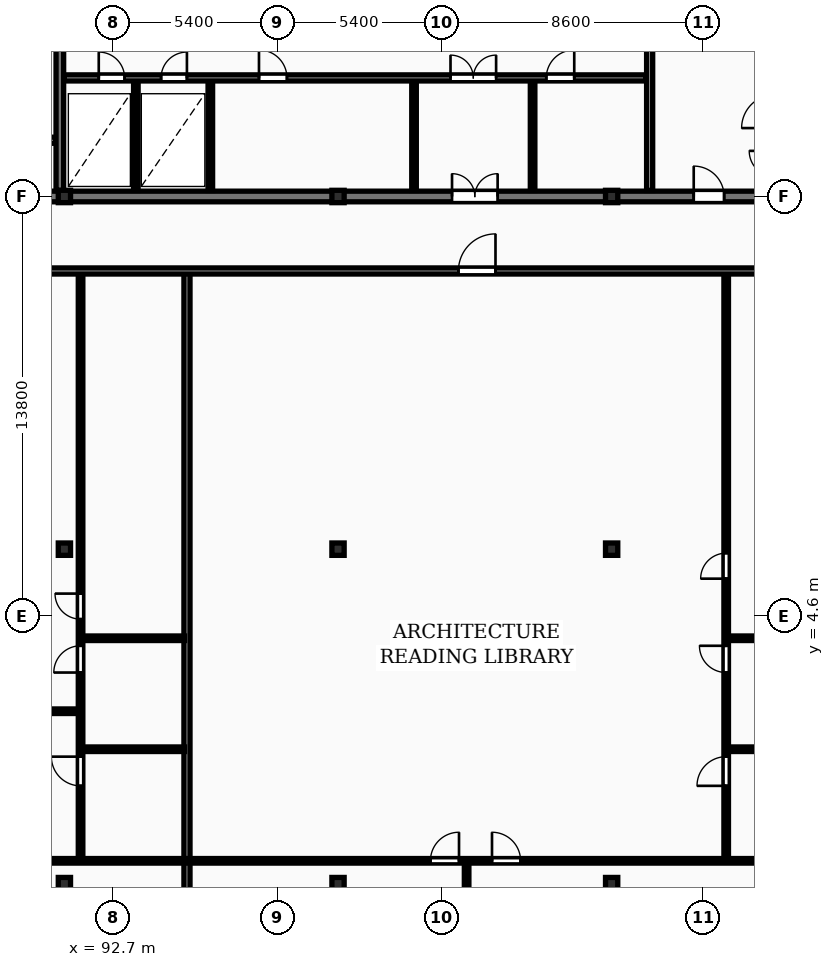
"""IFC4 building model, lengths in metres.
Left out: names, types, materials, properties, quantities, classifications, styles, units other than length and angle.
Written with IfcOpenShell. Run it as: python <this file> out.ifc"""

import sys

from ifc_helpers import new_model, si_unit, direction, frame, frame_2d, origin, origin_2d, place, context, subcontext, project, spatial, rectangle, i_section, extrude, element, fill, save


model = new_model("IFC4")
c1 = context("Model", 3, precision=1e-05, world=origin(), true_north=direction((0.0, 1.0)))
c2 = subcontext(c1, "Body", "Model", "MODEL_VIEW")
j1 = project(units=[si_unit("LENGTHUNIT", "METRE"), si_unit("PLANEANGLEUNIT", "RADIAN")], contexts=[c1])
p1 = place(None, origin())
s1 = spatial("IfcSite", under=j1, at=p1, CompositionType="ELEMENT")
p2 = place(p1, origin())
s2 = spatial("IfcBuilding", under=s1, at=p2, CompositionType="ELEMENT")
p3 = place(p2, frame((0.0, 0.0, 153.7)))
s3 = spatial("IfcBuildingStorey", under=s2, at=p3, CompositionType="ELEMENT", Elevation=153.7)
for number, where, z_axis, x_axis in (
    (1, (91.1, -4.2, 0.0), (0.0, 0.0, 1.0), (1.0, 0.0, 0.0)),
    (2, (91.1, 6.8, 0.0), (0.0, 0.0, 1.0), (1.0, 0.0, 0.0)),
    (3, (91.1, 18.4, 0.0), (0.0, 0.0, 1.0), (1.0, 0.0, 0.0)),
    (4, (100.1, -4.2, 0.0), (0.0, 0.0, 1.0), (1.0, 0.0, 0.0)),
    (5, (100.1, 6.8, 0.0), (0.0, 0.0, 1.0), (1.0, 0.0, 0.0)),
    (6, (100.1, 18.4, 0.0), (0.0, 0.0, 1.0), (1.0, 0.0, 0.0)),
    (7, (109.1, -4.2, 0.0), (0.0, 0.0, 1.0), (1.0, 0.0, 0.0)),
    (8, (109.1, 6.8, 0.0), (0.0, 0.0, 1.0), (1.0, 0.0, 0.0)),
    (9, (109.1, 18.4, 0.0), (0.0, 0.0, 1.0), (1.0, 0.0, 0.0)),
):
    element("IfcColumn", number, at=place(p3, frame(where, z_axis=z_axis, x_axis=x_axis)), inside=s3, PredefinedType="COLUMN", context=c2, shape_type="SweptSolid", body=[
        extrude(i_section(OverallWidth=0.403, OverallDepth=0.406, WebThickness=0.027, FlangeThickness=0.043, FilletRadius=0.015, at=origin_2d()), origin(), (0.0, 0.0, 1.0), 3.6),
    ])
p4 = place(p3, frame((81.925, 18.4, 0.0), z_axis=(0.0, 0.0, 1.0), x_axis=(1.0, 0.0, 0.0)))
e10 = element("IfcWall", 10, at=p4, inside=s3, PredefinedType="SHEAR", context=c2, shape_type="SweptSolid", body=[
    extrude(rectangle(XDim=36.265, YDim=0.35, at=frame_2d((18.132, 0.0))), origin(), (0.0, 0.0, 1.0), 3.6),
])
p5 = place(p4, frame((5.675, 0.0, 0.0)))
e11 = element("IfcOpeningElement", 11, at=p5, cuts=e10, PredefinedType="OPENING", context=c2, shape_type="SweptSolid", body=[
    extrude(rectangle(XDim=1.0, YDim=2.15, at=frame_2d((0.5, 1.075))), frame((0.0, 0.185, 0.0), z_axis=(0.0, -1.0, 0.0), x_axis=(1.0, 0.0, 0.0)), (0.0, 0.0, 1.0), 0.37),
])
p6 = place(p4, frame((21.925, 0.0, 0.0)))
e12 = element("IfcOpeningElement", 12, at=p6, cuts=e10, PredefinedType="OPENING", context=c2, shape_type="SweptSolid", body=[
    extrude(rectangle(XDim=1.5, YDim=2.2, at=frame_2d((0.75, 1.1))), frame((0.0, 0.185, 0.0), z_axis=(0.0, -1.0, 0.0), x_axis=(1.0, 0.0, 0.0)), (0.0, 0.0, 1.0), 0.37),
])
p7 = place(p4, frame((29.875, 0.0, 0.0)))
e13 = element("IfcOpeningElement", 13, at=p7, cuts=e10, PredefinedType="OPENING", context=c2, shape_type="SweptSolid", body=[
    extrude(rectangle(XDim=1.0, YDim=2.15, at=frame_2d((0.5, 1.075))), frame((0.0, 0.185, 0.0), z_axis=(0.0, -1.0, 0.0), x_axis=(1.0, 0.0, 0.0)), (0.0, 0.0, 1.0), 0.37),
])
p8 = place(p3, frame((86.5, 20.25, 0.0), z_axis=(0.0, 0.0, 1.0), x_axis=(1.0, 0.0, 0.0)))
e14 = element("IfcWall", 14, at=p8, inside=s3, PredefinedType="PARTITIONING", context=c2, shape_type="SweptSolid", body=[
    extrude(rectangle(XDim=4.32, YDim=0.2, at=frame_2d((2.16, 0.0))), origin(), (0.0, 0.0, 1.0), 3.32),
])
p9 = place(p8, frame((1.4, 0.0, 0.0)))
e15 = element("IfcOpeningElement", 15, at=p9, cuts=e14, PredefinedType="OPENING", context=c2, shape_type="SweptSolid", body=[
    extrude(rectangle(XDim=1.1, YDim=2.1, at=frame_2d((0.55, 1.05))), frame((0.0, 0.11, 0.0), z_axis=(0.0, -1.0, 0.0), x_axis=(1.0, 0.0, 0.0)), (0.0, 0.0, 1.0), 0.22),
])
p10 = place(p3, frame((90.95, 18.6, 0.0), z_axis=(0.0, 0.0, 1.0), x_axis=(0.0, 1.0, 0.0)))
e16 = element("IfcWall", 16, at=p10, inside=s3, PredefinedType="SHEAR", context=c2, shape_type="SweptSolid", body=[
    extrude(rectangle(XDim=11.6, YDim=0.25, at=frame_2d((5.8, 0.0))), origin(), (0.0, 0.0, 1.0), 3.6),
])
p11 = place(p10, frame((4.6, 0.0, 0.0)))
e17 = element("IfcOpeningElement", 17, at=p11, cuts=e16, PredefinedType="OPENING", context=c2, shape_type="SweptSolid", body=[
    extrude(rectangle(XDim=1.1, YDim=2.1, at=frame_2d((0.55, 1.05))), frame((0.0, 0.135, 0.0), z_axis=(0.0, -1.0, 0.0), x_axis=(1.0, 0.0, 0.0)), (0.0, 0.0, 1.0), 0.27),
])
for number, where, z_axis, x_axis in (
    (18, (93.45, 18.6, 0.0), (0.0, 0.0, 1.0), (0.0, 1.0, 0.0)),
    (19, (95.9, 18.6, 0.0), (0.0, 0.0, 1.0), (0.0, 1.0, 0.0)),
    (20, (102.6, 18.6, 0.0), (0.0, 0.0, 1.0), (0.0, 1.0, 0.0)),
    (21, (106.5, 18.6, 0.0), (0.0, 0.0, 1.0), (0.0, 1.0, 0.0)),
):
    element("IfcWall", number, at=place(p3, frame(where, z_axis=z_axis, x_axis=x_axis)), inside=s3, PredefinedType="PARTITIONING", context=c2, shape_type="SweptSolid", body=[
        extrude(rectangle(XDim=3.6, YDim=0.15, at=frame_2d((1.8, 0.0))), origin(), (0.0, 0.0, 1.0), 3.32),
    ])
p12 = place(p3, frame((91.08, 22.3, 0.0), z_axis=(0.0, 0.0, 1.0), x_axis=(1.0, 0.0, 0.0)))
e22 = element("IfcWall", 22, at=p12, inside=s3, PredefinedType="PARTITIONING", context=c2, shape_type="SweptSolid", body=[
    extrude(rectangle(XDim=19.14, YDim=0.2, at=frame_2d((9.57, 0.0))), origin(), (0.0, 0.0, 1.0), 3.32),
])
p13 = place(p12, frame((1.15, 0.0, 0.0)))
e23 = element("IfcOpeningElement", 23, at=p13, cuts=e22, PredefinedType="OPENING", context=c2, shape_type="SweptSolid", body=[
    extrude(rectangle(XDim=0.85, YDim=2.05, at=frame_2d((0.425, 1.025))), frame((0.0, 0.11, 0.0), z_axis=(0.0, -1.0, 0.0), x_axis=(1.0, 0.0, 0.0)), (0.0, 0.0, 1.0), 0.22),
])
p14 = place(p12, frame((3.2, 0.0, 0.0)))
e24 = element("IfcOpeningElement", 24, at=p14, cuts=e22, PredefinedType="OPENING", context=c2, shape_type="SweptSolid", body=[
    extrude(rectangle(XDim=0.85, YDim=2.05, at=frame_2d((0.425, 1.025))), frame((0.0, 0.11, 0.0), z_axis=(0.0, -1.0, 0.0), x_axis=(1.0, 0.0, 0.0)), (0.0, 0.0, 1.0), 0.22),
])
p15 = place(p12, frame((12.72, 0.0, 0.0)))
e25 = element("IfcOpeningElement", 25, at=p15, cuts=e22, PredefinedType="OPENING", context=c2, shape_type="SweptSolid", body=[
    extrude(rectangle(XDim=1.5, YDim=2.2, at=frame_2d((0.75, 1.1))), frame((0.0, 0.11, 0.0), z_axis=(0.0, -1.0, 0.0), x_axis=(1.0, 0.0, 0.0)), (0.0, 0.0, 1.0), 0.22),
])
p16 = place(p12, frame((6.42, 0.0, 0.0)))
e26 = element("IfcOpeningElement", 26, at=p16, cuts=e22, PredefinedType="OPENING", context=c2, shape_type="SweptSolid", body=[
    extrude(rectangle(XDim=0.92, YDim=2.08, at=frame_2d((0.46, 1.04))), frame((0.0, 0.11, 0.0), z_axis=(0.0, -1.0, 0.0), x_axis=(1.0, 0.0, 0.0)), (0.0, 0.0, 1.0), 0.22),
])
p17 = place(p12, frame((15.87, 0.0, 0.0)))
e27 = element("IfcOpeningElement", 27, at=p17, cuts=e22, PredefinedType="OPENING", context=c2, shape_type="SweptSolid", body=[
    extrude(rectangle(XDim=0.92, YDim=2.08, at=frame_2d((0.46, 1.04))), frame((0.0, 0.11, 0.0), z_axis=(0.0, -1.0, 0.0), x_axis=(1.0, 0.0, 0.0)), (0.0, 0.0, 1.0), 0.22),
])
p18 = place(p3, frame((110.35, 18.6, 0.0), z_axis=(0.0, 0.0, 1.0), x_axis=(0.0, 1.0, 0.0)))
e28 = element("IfcWall", 28, at=p18, inside=s3, PredefinedType="PARTITIONING", context=c2, shape_type="SweptSolid", body=[
    extrude(rectangle(XDim=11.6, YDim=0.2, at=frame_2d((5.8, 0.0))), origin(), (0.0, 0.0, 1.0), 3.32),
])
p19 = place(p18, frame((5.2, 0.0, 0.0)))
e29 = element("IfcOpeningElement", 29, at=p19, cuts=e28, PredefinedType="OPENING", context=c2, shape_type="SweptSolid", body=[
    extrude(rectangle(XDim=1.1, YDim=2.15, at=frame_2d((0.55, 1.075))), frame((0.0, 0.11, 0.0), z_axis=(0.0, -1.0, 0.0), x_axis=(1.0, 0.0, 0.0)), (0.0, 0.0, 1.0), 0.22),
])
p20 = place(p3, frame((95.132, -8.7, 0.0), z_axis=(0.0, 0.0, 1.0), x_axis=(0.0, 1.0, 0.0)))
e30 = element("IfcWall", 30, at=p20, inside=s3, PredefinedType="PARTITIONING", context=c2, shape_type="SweptSolid", body=[
    extrude(rectangle(XDim=24.57, YDim=0.2, at=frame_2d((12.285, 0.0))), origin(), (0.0, 0.0, 1.0), 3.32),
])
p21 = place(p3, frame((72.78, 1.47, 0.0), z_axis=(0.0, 0.0, 1.0), x_axis=(1.0, 0.0, 0.0)))
e31 = element("IfcWall", 31, at=p21, inside=s3, PredefinedType="PARTITIONING", context=c2, shape_type="SweptSolid", body=[
    extrude(rectangle(XDim=18.812, YDim=0.15, at=frame_2d((9.406, 0.0))), origin(), (0.0, 0.0, 1.0), 3.32),
])
p22 = place(p21, frame((8.936, 0.0, 0.0)))
e32 = element("IfcOpeningElement", 32, at=p22, cuts=e31, PredefinedType="OPENING", context=c2, shape_type="SweptSolid", body=[
    extrude(rectangle(XDim=0.94, YDim=2.1, at=frame_2d((0.47, 1.05))), frame((0.0, 0.085, 0.0), z_axis=(0.0, -1.0, 0.0), x_axis=(1.0, 0.0, 0.0)), (0.0, 0.0, 1.0), 0.17),
])
for number, where, z_axis, x_axis in (
    (33, (91.691, 0.22, 0.0), (0.0, 0.0, 1.0), (1.0, 0.0, 0.0)),
    (34, (91.691, 3.87, 0.0), (0.0, 0.0, 1.0), (1.0, 0.0, 0.0)),
):
    element("IfcWall", number, at=place(p3, frame(where, z_axis=z_axis, x_axis=x_axis)), inside=s3, PredefinedType="PARTITIONING", context=c2, shape_type="SweptSolid", body=[
        extrude(rectangle(XDim=3.36, YDim=0.15, at=frame_2d((1.68, 0.0))), origin(), (0.0, 0.0, 1.0), 3.32),
    ])
p23 = place(p3, frame((91.632, -3.39, 0.0), z_axis=(0.0, 0.0, 1.0), x_axis=(0.0, 1.0, 0.0)))
e35 = element("IfcWall", 35, at=p23, inside=s3, PredefinedType="PARTITIONING", context=c2, shape_type="SweptSolid", body=[
    extrude(rectangle(XDim=19.28, YDim=0.15, at=frame_2d((9.64, 0.0))), origin(), (0.0, 0.0, 1.0), 3.32),
])
p24 = place(p23, frame((2.406, 0.0, 0.0)))
e36 = element("IfcOpeningElement", 36, at=p24, cuts=e35, PredefinedType="OPENING", context=c2, shape_type="SweptSolid", body=[
    extrude(rectangle(XDim=0.96, YDim=2.1, at=frame_2d((0.48, 1.05))), frame((0.0, 0.085, 0.0), z_axis=(0.0, -1.0, 0.0), x_axis=(1.0, 0.0, 0.0)), (0.0, 0.0, 1.0), 0.17),
])
p25 = place(p23, frame((6.133, 0.0, 0.0)))
e37 = element("IfcOpeningElement", 37, at=p25, cuts=e35, PredefinedType="OPENING", context=c2, shape_type="SweptSolid", body=[
    extrude(rectangle(XDim=0.88, YDim=2.06, at=frame_2d((0.44, 1.03))), frame((0.0, 0.085, 0.0), z_axis=(0.0, -1.0, 0.0), x_axis=(1.0, 0.0, 0.0)), (0.0, 0.0, 1.0), 0.17),
])
p26 = place(p23, frame((7.889, 0.0, 0.0)))
e38 = element("IfcOpeningElement", 38, at=p26, cuts=e35, PredefinedType="OPENING", context=c2, shape_type="SweptSolid", body=[
    extrude(rectangle(XDim=0.84, YDim=2.04, at=frame_2d((0.42, 1.02))), frame((0.0, 0.085, 0.0), z_axis=(0.0, -1.0, 0.0), x_axis=(1.0, 0.0, 0.0)), (0.0, 0.0, 1.0), 0.17),
])
p27 = place(p3, frame((72.78, -3.45, 0.0), z_axis=(0.0, 0.0, 1.0), x_axis=(1.0, 0.0, 0.0)))
e39 = element("IfcWall", 39, at=p27, inside=s3, PredefinedType="PARTITIONING", context=c2, shape_type="SweptSolid", body=[
    extrude(rectangle(XDim=22.271, YDim=0.15, at=frame_2d((11.136, 0.0))), origin(), (0.0, 0.0, 1.0), 3.32),
])
p28 = place(p27, frame((6.871, 0.0, 0.0)))
e40 = element("IfcOpeningElement", 40, at=p28, cuts=e39, PredefinedType="OPENING", context=c2, shape_type="SweptSolid", body=[
    extrude(rectangle(XDim=0.94, YDim=2.1, at=frame_2d((0.47, 1.05))), frame((0.0, 0.085, 0.0), z_axis=(0.0, -1.0, 0.0), x_axis=(1.0, 0.0, 0.0)), (0.0, 0.0, 1.0), 0.17),
])
p29 = place(p27, frame((10.735, 0.0, 0.0)))
e41 = element("IfcOpeningElement", 41, at=p29, cuts=e39, PredefinedType="OPENING", context=c2, shape_type="SweptSolid", body=[
    extrude(rectangle(XDim=0.94, YDim=2.1, at=frame_2d((0.47, 1.05))), frame((0.0, 0.085, 0.0), z_axis=(0.0, -1.0, 0.0), x_axis=(1.0, 0.0, 0.0)), (0.0, 0.0, 1.0), 0.17),
])
for number, where, z_axis, x_axis in (
    (42, (112.928, 0.22, 0.0), (0.0, 0.0, 1.0), (1.0, 0.0, 0.0)),
    (43, (112.928, 3.87, 0.0), (0.0, 0.0, 1.0), (1.0, 0.0, 0.0)),
):
    element("IfcWall", number, at=place(p3, frame(where, z_axis=z_axis, x_axis=x_axis)), inside=s3, PredefinedType="PARTITIONING", context=c2, shape_type="SweptSolid", body=[
        extrude(rectangle(XDim=3.13, YDim=0.15, at=frame_2d((1.565, 0.0))), origin(), (0.0, 0.0, 1.0), 3.32),
    ])
p30 = place(p3, frame((112.868, -3.39, 0.0), z_axis=(0.0, 0.0, 1.0), x_axis=(0.0, 1.0, 0.0)))
e44 = element("IfcWall", 44, at=p30, inside=s3, PredefinedType="PARTITIONING", context=c2, shape_type="SweptSolid", body=[
    extrude(rectangle(XDim=19.28, YDim=0.15, at=frame_2d((9.64, 0.0))), origin(), (0.0, 0.0, 1.0), 3.32),
])
p31 = place(p30, frame((2.406, 0.0, 0.0)))
e45 = element("IfcOpeningElement", 45, at=p31, cuts=e44, PredefinedType="OPENING", context=c2, shape_type="SweptSolid", body=[
    extrude(rectangle(XDim=0.96, YDim=2.1, at=frame_2d((0.48, 1.05))), frame((0.0, 0.085, 0.0), z_axis=(0.0, -1.0, 0.0), x_axis=(1.0, 0.0, 0.0)), (0.0, 0.0, 1.0), 0.17),
])
p32 = place(p30, frame((6.133, 0.0, 0.0)))
e46 = element("IfcOpeningElement", 46, at=p32, cuts=e44, PredefinedType="OPENING", context=c2, shape_type="SweptSolid", body=[
    extrude(rectangle(XDim=0.88, YDim=2.06, at=frame_2d((0.44, 1.03))), frame((0.0, 0.085, 0.0), z_axis=(0.0, -1.0, 0.0), x_axis=(1.0, 0.0, 0.0)), (0.0, 0.0, 1.0), 0.17),
])
p33 = place(p30, frame((9.22, 0.0, 0.0)))
e47 = element("IfcOpeningElement", 47, at=p33, cuts=e44, PredefinedType="OPENING", context=c2, shape_type="SweptSolid", body=[
    extrude(rectangle(XDim=0.84, YDim=2.04, at=frame_2d((0.42, 1.02))), frame((0.0, 0.085, 0.0), z_axis=(0.0, -1.0, 0.0), x_axis=(1.0, 0.0, 0.0)), (0.0, 0.0, 1.0), 0.17),
])
p34 = place(p3, frame((104.33, -8.7, 0.0), z_axis=(0.0, 0.0, 1.0), x_axis=(0.0, 1.0, 0.0)))
e48 = element("IfcWall", 48, at=p34, inside=s3, PredefinedType="PARTITIONING", context=c2, shape_type="SweptSolid", body=[
    extrude(rectangle(XDim=5.17, YDim=0.15, at=frame_2d((2.585, 0.0))), origin(), (0.0, 0.0, 1.0), 3.32),
])
p35 = place(p3, frame((95.211, -3.45, 0.0), z_axis=(0.0, 0.0, 1.0), x_axis=(1.0, 0.0, 0.0)))
e49 = element("IfcWall", 49, at=p35, inside=s3, PredefinedType="PARTITIONING", context=c2, shape_type="SweptSolid", body=[
    extrude(rectangle(XDim=20.847, YDim=0.15, at=frame_2d((10.423, 0.0))), origin(), (0.0, 0.0, 1.0), 3.32),
])
p36 = place(p35, frame((7.928, 0.0, 0.0)))
e50 = element("IfcOpeningElement", 50, at=p36, cuts=e49, PredefinedType="OPENING", context=c2, shape_type="SweptSolid", body=[
    extrude(rectangle(XDim=0.94, YDim=2.1, at=frame_2d((0.47, 1.05))), frame((0.0, 0.085, 0.0), z_axis=(0.0, -1.0, 0.0), x_axis=(1.0, 0.0, 0.0)), (0.0, 0.0, 1.0), 0.17),
])
p37 = place(p35, frame((9.953, 0.0, 0.0)))
e51 = element("IfcOpeningElement", 51, at=p37, cuts=e49, PredefinedType="OPENING", context=c2, shape_type="SweptSolid", body=[
    extrude(rectangle(XDim=0.94, YDim=2.1, at=frame_2d((0.47, 1.05))), frame((0.0, 0.085, 0.0), z_axis=(0.0, -1.0, 0.0), x_axis=(1.0, 0.0, 0.0)), (0.0, 0.0, 1.0), 0.17),
])
p38 = place(p3, frame((72.7, 15.95, 0.0), z_axis=(0.0, 0.0, 1.0), x_axis=(1.0, 0.0, 0.0)))
e52 = element("IfcWall", 52, at=p38, inside=s3, PredefinedType="PARTITIONING", context=c2, shape_type="SweptSolid", body=[
    extrude(rectangle(XDim=58.0, YDim=0.2, at=frame_2d((29.0, 0.0))), origin(), (0.0, 0.0, 1.0), 3.32),
])
p39 = place(p38, frame((10.967, 0.0, 0.0)))
e53 = element("IfcOpeningElement", 53, at=p39, cuts=e52, PredefinedType="OPENING", context=c2, shape_type="SweptSolid", body=[
    extrude(rectangle(XDim=1.22, YDim=2.18, at=frame_2d((0.61, 1.09))), frame((0.0, 0.11, 0.0), z_axis=(0.0, -1.0, 0.0), x_axis=(1.0, 0.0, 0.0)), (0.0, 0.0, 1.0), 0.22),
])
p40 = place(p38, frame((31.36, 0.0, 0.0)))
e54 = element("IfcOpeningElement", 54, at=p40, cuts=e52, PredefinedType="OPENING", context=c2, shape_type="SweptSolid", body=[
    extrude(rectangle(XDim=1.22, YDim=2.18, at=frame_2d((0.61, 1.09))), frame((0.0, 0.11, 0.0), z_axis=(0.0, -1.0, 0.0), x_axis=(1.0, 0.0, 0.0)), (0.0, 0.0, 1.0), 0.22),
])
p41 = place(p38, frame((45.483, 0.0, 0.0)))
e55 = element("IfcOpeningElement", 55, at=p41, cuts=e52, PredefinedType="OPENING", context=c2, shape_type="SweptSolid", body=[
    extrude(rectangle(XDim=0.95, YDim=2.15, at=frame_2d((0.475, 1.075))), frame((0.0, 0.11, 0.0), z_axis=(0.0, -1.0, 0.0), x_axis=(1.0, 0.0, 0.0)), (0.0, 0.0, 1.0), 0.22),
])
p42 = place(p6, origin())
e56 = element("IfcDoor", 56, at=p42, inside=s3, OperationType="DOUBLE_DOOR_SINGLE_SWING", PredefinedType="DOOR", context=c2, shape_type="SweptSolid", body=[
    extrude(rectangle(XDim=1.5, YDim=2.2, at=frame_2d((0.75, 1.1))), frame((0.0, 0.025, 0.0), z_axis=(0.0, -1.0, 0.0), x_axis=(1.0, 0.0, 0.0)), (0.0, 0.0, 1.0), 0.05),
])
fill(e12, e56)
p43 = place(p7, origin())
e57 = element("IfcDoor", 57, at=p43, inside=s3, OperationType="SINGLE_SWING_LEFT", PredefinedType="DOOR", context=c2, shape_type="SweptSolid", body=[
    extrude(rectangle(XDim=1.0, YDim=2.15, at=frame_2d((0.5, 1.075))), frame((0.0, 0.025, 0.0), z_axis=(0.0, -1.0, 0.0), x_axis=(1.0, 0.0, 0.0)), (0.0, 0.0, 1.0), 0.05),
])
fill(e13, e57)
p44 = place(p13, origin())
e58 = element("IfcDoor", 58, at=p44, inside=s3, OperationType="SINGLE_SWING_LEFT", PredefinedType="DOOR", context=c2, shape_type="SweptSolid", body=[
    extrude(rectangle(XDim=0.85, YDim=2.05, at=frame_2d((0.425, 1.025))), frame((0.0, 0.025, 0.0), z_axis=(0.0, -1.0, 0.0), x_axis=(1.0, 0.0, 0.0)), (0.0, 0.0, 1.0), 0.05),
])
fill(e23, e58)
p45 = place(p14, origin())
e59 = element("IfcDoor", 59, at=p45, inside=s3, OperationType="SINGLE_SWING_RIGHT", PredefinedType="DOOR", context=c2, shape_type="SweptSolid", body=[
    extrude(rectangle(XDim=0.85, YDim=2.05, at=frame_2d((0.425, 1.025))), frame((0.0, 0.025, 0.0), z_axis=(0.0, -1.0, 0.0), x_axis=(1.0, 0.0, 0.0)), (0.0, 0.0, 1.0), 0.05),
])
fill(e24, e59)
p46 = place(p15, origin())
e60 = element("IfcDoor", 60, at=p46, inside=s3, OperationType="DOUBLE_DOOR_SINGLE_SWING", PredefinedType="DOOR", context=c2, shape_type="SweptSolid", body=[
    extrude(rectangle(XDim=1.5, YDim=2.2, at=frame_2d((0.75, 1.1))), frame((0.0, 0.025, 0.0), z_axis=(0.0, -1.0, 0.0), x_axis=(1.0, 0.0, 0.0)), (0.0, 0.0, 1.0), 0.05),
])
fill(e25, e60)
p47 = place(p16, origin())
e61 = element("IfcDoor", 61, at=p47, inside=s3, OperationType="SINGLE_SWING_LEFT", PredefinedType="DOOR", context=c2, shape_type="SweptSolid", body=[
    extrude(rectangle(XDim=0.92, YDim=2.08, at=frame_2d((0.46, 1.04))), frame((0.0, 0.025, 0.0), z_axis=(0.0, -1.0, 0.0), x_axis=(1.0, 0.0, 0.0)), (0.0, 0.0, 1.0), 0.05),
])
fill(e26, e61)
p48 = place(p17, origin())
e62 = element("IfcDoor", 62, at=p48, inside=s3, OperationType="SINGLE_SWING_RIGHT", PredefinedType="DOOR", context=c2, shape_type="SweptSolid", body=[
    extrude(rectangle(XDim=0.92, YDim=2.08, at=frame_2d((0.46, 1.04))), frame((0.0, 0.025, 0.0), z_axis=(0.0, -1.0, 0.0), x_axis=(1.0, 0.0, 0.0)), (0.0, 0.0, 1.0), 0.05),
])
fill(e27, e62)
p49 = place(p24, origin())
e63 = element("IfcDoor", 63, at=p49, inside=s3, OperationType="SINGLE_SWING_RIGHT", PredefinedType="DOOR", context=c2, shape_type="SweptSolid", body=[
    extrude(rectangle(XDim=0.96, YDim=2.1, at=frame_2d((0.48, 1.05))), frame((0.0, 0.025, 0.0), z_axis=(0.0, -1.0, 0.0), x_axis=(1.0, 0.0, 0.0)), (0.0, 0.0, 1.0), 0.05),
])
fill(e36, e63)
p50 = place(p25, origin())
e64 = element("IfcDoor", 64, at=p50, inside=s3, OperationType="SINGLE_SWING_LEFT", PredefinedType="DOOR", context=c2, shape_type="SweptSolid", body=[
    extrude(rectangle(XDim=0.88, YDim=2.06, at=frame_2d((0.44, 1.03))), frame((0.0, 0.025, 0.0), z_axis=(0.0, -1.0, 0.0), x_axis=(1.0, 0.0, 0.0)), (0.0, 0.0, 1.0), 0.05),
])
fill(e37, e64)
p51 = place(p26, origin())
e65 = element("IfcDoor", 65, at=p51, inside=s3, OperationType="SINGLE_SWING_RIGHT", PredefinedType="DOOR", context=c2, shape_type="SweptSolid", body=[
    extrude(rectangle(XDim=0.84, YDim=2.04, at=frame_2d((0.42, 1.02))), frame((0.0, 0.025, 0.0), z_axis=(0.0, -1.0, 0.0), x_axis=(1.0, 0.0, 0.0)), (0.0, 0.0, 1.0), 0.05),
])
fill(e38, e65)
p52 = place(p31, origin())
e66 = element("IfcDoor", 66, at=p52, inside=s3, OperationType="SINGLE_SWING_LEFT", PredefinedType="DOOR", context=c2, shape_type="SweptSolid", body=[
    extrude(rectangle(XDim=0.96, YDim=2.1, at=frame_2d((0.48, 1.05))), frame((0.0, 0.025, 0.0), z_axis=(0.0, -1.0, 0.0), x_axis=(1.0, 0.0, 0.0)), (0.0, 0.0, 1.0), 0.05),
])
fill(e45, e66)
p53 = place(p32, origin())
e67 = element("IfcDoor", 67, at=p53, inside=s3, OperationType="SINGLE_SWING_RIGHT", PredefinedType="DOOR", context=c2, shape_type="SweptSolid", body=[
    extrude(rectangle(XDim=0.88, YDim=2.06, at=frame_2d((0.44, 1.03))), frame((0.0, 0.025, 0.0), z_axis=(0.0, -1.0, 0.0), x_axis=(1.0, 0.0, 0.0)), (0.0, 0.0, 1.0), 0.05),
])
fill(e46, e67)
p54 = place(p33, origin())
e68 = element("IfcDoor", 68, at=p54, inside=s3, OperationType="SINGLE_SWING_LEFT", PredefinedType="DOOR", context=c2, shape_type="SweptSolid", body=[
    extrude(rectangle(XDim=0.84, YDim=2.04, at=frame_2d((0.42, 1.02))), frame((0.0, 0.025, 0.0), z_axis=(0.0, -1.0, 0.0), x_axis=(1.0, 0.0, 0.0)), (0.0, 0.0, 1.0), 0.05),
])
fill(e47, e68)
p55 = place(p36, origin())
e69 = element("IfcDoor", 69, at=p55, inside=s3, OperationType="SINGLE_SWING_RIGHT", PredefinedType="DOOR", context=c2, shape_type="SweptSolid", body=[
    extrude(rectangle(XDim=0.94, YDim=2.1, at=frame_2d((0.47, 1.05))), frame((0.0, 0.025, 0.0), z_axis=(0.0, -1.0, 0.0), x_axis=(1.0, 0.0, 0.0)), (0.0, 0.0, 1.0), 0.05),
])
fill(e50, e69)
p56 = place(p37, origin())
e70 = element("IfcDoor", 70, at=p56, inside=s3, OperationType="SINGLE_SWING_LEFT", PredefinedType="DOOR", context=c2, shape_type="SweptSolid", body=[
    extrude(rectangle(XDim=0.94, YDim=2.1, at=frame_2d((0.47, 1.05))), frame((0.0, 0.025, 0.0), z_axis=(0.0, -1.0, 0.0), x_axis=(1.0, 0.0, 0.0)), (0.0, 0.0, 1.0), 0.05),
])
fill(e51, e70)
p57 = place(p40, origin())
e71 = element("IfcDoor", 71, at=p57, inside=s3, OperationType="SINGLE_SWING_RIGHT", PredefinedType="DOOR", context=c2, shape_type="SweptSolid", body=[
    extrude(rectangle(XDim=1.22, YDim=2.18, at=frame_2d((0.61, 1.09))), frame((0.0, 0.025, 0.0), z_axis=(0.0, -1.0, 0.0), x_axis=(1.0, 0.0, 0.0)), (0.0, 0.0, 1.0), 0.05),
])
fill(e54, e71)
save(model, sys.argv[1])
